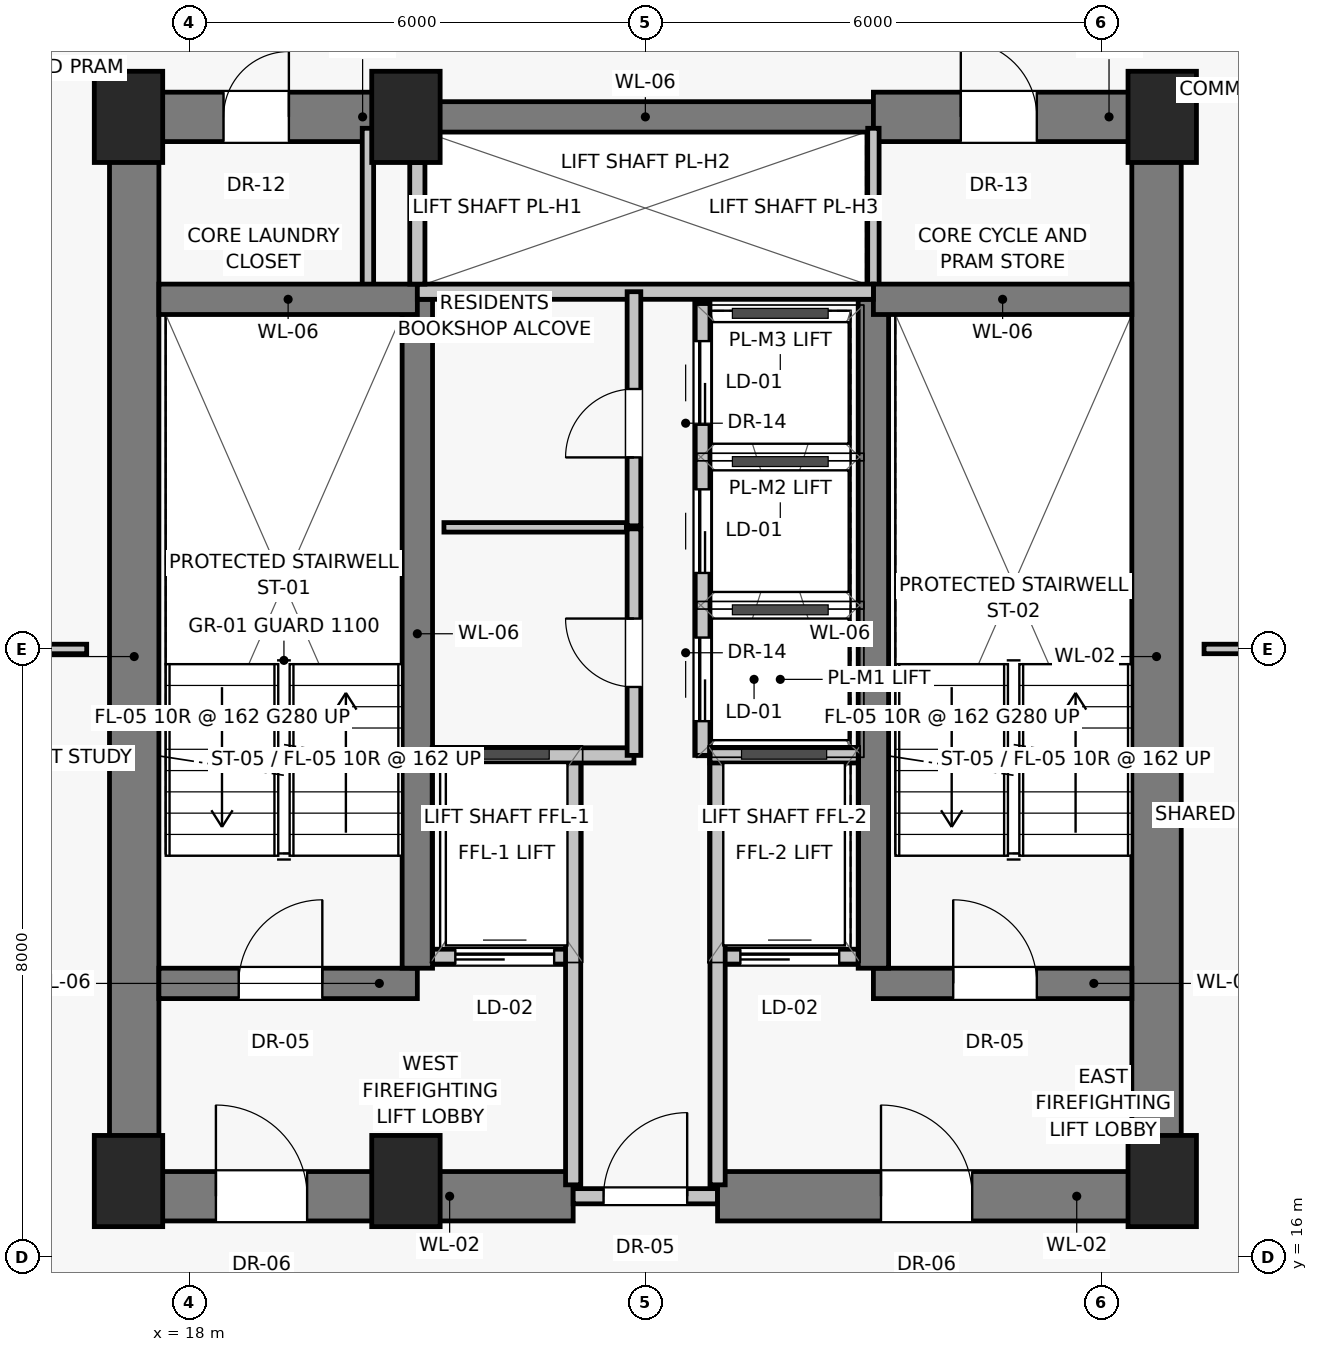
"""IFC4 building model, lengths in metres.
Left out: names, types, materials, properties, quantities, classifications, styles, units other than length and angle.
Written with IfcOpenShell. Run it as: python <this file> out.ifc"""

import sys

from ifc_helpers import new_model, si_unit, direction, frame, frame_2d, origin, origin_2d, place, context, subcontext, project, spatial, rectangle, extrude, source, transform, mapped, element, fill, save


model = new_model("IFC4")
c1 = context("Model", 3, precision=1e-05, world=origin(), true_north=direction((0.0, 1.0)))
c2 = subcontext(c1, "Body", "Model", "MODEL_VIEW")
j1 = project(units=[si_unit("LENGTHUNIT", "METRE"), si_unit("PLANEANGLEUNIT", "RADIAN")], contexts=[c1])
p1 = place(None, origin())
s1 = spatial("IfcSite", under=j1, at=p1, CompositionType="ELEMENT")
p2 = place(p1, origin())
s2 = spatial("IfcBuilding", under=s1, at=p2, CompositionType="ELEMENT")
p3 = place(p2, frame((0.0, 0.0, 105.7)))
s3 = spatial("IfcBuildingStorey", under=s2, at=p3, CompositionType="ELEMENT", Elevation=105.7)
for number, where, z_axis, x_axis in (
    (1, (17.2, 17.0, 0.0), (0.0, 0.0, 1.0), (1.0, 0.0, 0.0)),
    (2, (20.85, 17.0, 0.0), (0.0, 0.0, 1.0), (1.0, 0.0, 0.0)),
    (3, (30.8, 17.0, 0.0), (0.0, 0.0, 1.0), (1.0, 0.0, 0.0)),
    (4, (17.2, 31.0, 0.0), (0.0, 0.0, 1.0), (1.0, 0.0, 0.0)),
    (5, (20.85, 31.0, 0.0), (0.0, 0.0, 1.0), (1.0, 0.0, 0.0)),
    (6, (30.8, 31.0, 0.0), (0.0, 0.0, 1.0), (1.0, 0.0, 0.0)),
):
    element("IfcColumn", number, at=place(p3, frame(where, z_axis=z_axis, x_axis=x_axis)), inside=s3, PredefinedType="PILASTER", context=c2, shape_type="SweptSolid", body=[
        extrude(rectangle(XDim=0.9, YDim=1.2, at=origin_2d()), origin(), (0.0, 0.0, 1.0), 3.25),
    ])
for number, where, z_axis, x_axis in (
    (7, (17.275, 16.8, 0.0), (0.0, 0.0, 1.0), (0.0, 1.0, 0.0)),
    (8, (30.725, 16.8, 0.0), (0.0, 0.0, 1.0), (0.0, 1.0, 0.0)),
):
    element("IfcWall", number, at=place(p3, frame(where, z_axis=z_axis, x_axis=x_axis)), inside=s3, PredefinedType="SHEAR", context=c2, shape_type="SweptSolid", body=[
        extrude(rectangle(XDim=14.2, YDim=0.65, at=frame_2d((7.1, 0.0))), origin(), (0.0, 0.0, 1.0), 2.97),
    ])
p4 = place(p3, frame((17.2, 16.8, 0.0), z_axis=(0.0, 0.0, 1.0), x_axis=(1.0, 0.0, 0.0)))
e9 = element("IfcWall", 9, at=p4, inside=s3, PredefinedType="SHEAR", context=c2, shape_type="SweptSolid", body=[
    extrude(rectangle(XDim=5.85, YDim=0.65, at=frame_2d((2.925, 0.0))), origin(), (0.0, 0.0, 1.0), 2.97),
])
p5 = place(p4, frame((1.15, 0.0, 0.0)))
e10 = element("IfcOpeningElement", 10, at=p5, cuts=e9, PredefinedType="OPENING", context=c2, shape_type="SweptSolid", body=[
    extrude(rectangle(XDim=1.2, YDim=2.03, at=frame_2d((0.6, 1.015))), frame((0.0, 0.335, 0.0), z_axis=(0.0, -1.0, 0.0), x_axis=(1.0, 0.0, 0.0)), (0.0, 0.0, 1.0), 0.67),
])
p6 = place(p3, frame((23.05, 16.8, 0.0), z_axis=(0.0, 0.0, 1.0), x_axis=(1.0, 0.0, 0.0)))
e11 = element("IfcWall", 11, at=p6, inside=s3, PredefinedType="SOLIDWALL", context=c2, shape_type="SweptSolid", body=[
    extrude(rectangle(XDim=1.9, YDim=0.2, at=frame_2d((0.95, 0.0))), origin(), (0.0, 0.0, 1.0), 2.12),
])
p7 = place(p6, frame((0.4, 0.0, 0.0)))
e12 = element("IfcOpeningElement", 12, at=p7, cuts=e11, PredefinedType="OPENING", context=c2, shape_type="SweptSolid", body=[
    extrude(rectangle(XDim=1.1, YDim=2.03, at=frame_2d((0.55, 1.015))), frame((0.0, 0.11, 0.0), z_axis=(0.0, -1.0, 0.0), x_axis=(1.0, 0.0, 0.0)), (0.0, 0.0, 1.0), 0.22),
])
p8 = place(p3, frame((24.95, 16.8, 0.0), z_axis=(0.0, 0.0, 1.0), x_axis=(1.0, 0.0, 0.0)))
e13 = element("IfcWall", 13, at=p8, inside=s3, PredefinedType="SHEAR", context=c2, shape_type="SweptSolid", body=[
    extrude(rectangle(XDim=5.85, YDim=0.65, at=frame_2d((2.925, 0.0))), origin(), (0.0, 0.0, 1.0), 2.97),
])
p9 = place(p8, frame((2.15, 0.0, 0.0)))
e14 = element("IfcOpeningElement", 14, at=p9, cuts=e13, PredefinedType="OPENING", context=c2, shape_type="SweptSolid", body=[
    extrude(rectangle(XDim=1.2, YDim=2.03, at=frame_2d((0.6, 1.015))), frame((0.0, 0.335, 0.0), z_axis=(0.0, -1.0, 0.0), x_axis=(1.0, 0.0, 0.0)), (0.0, 0.0, 1.0), 0.67),
])
p10 = place(p3, frame((17.2, 31.0, 0.0), z_axis=(0.0, 0.0, 1.0), x_axis=(1.0, 0.0, 0.0)))
e15 = element("IfcWall", 15, at=p10, inside=s3, PredefinedType="SHEAR", context=c2, shape_type="SweptSolid", body=[
    extrude(rectangle(XDim=3.8, YDim=0.65, at=frame_2d((1.9, 0.0))), origin(), (0.0, 0.0, 1.0), 2.97),
])
p11 = place(p10, frame((1.25, 0.0, 0.0)))
e16 = element("IfcOpeningElement", 16, at=p11, cuts=e15, PredefinedType="OPENING", context=c2, shape_type="SweptSolid", body=[
    extrude(rectangle(XDim=0.86, YDim=2.01, at=frame_2d((0.43, 1.005))), frame((0.0, 0.335, 0.0), z_axis=(0.0, -1.0, 0.0), x_axis=(1.0, 0.0, 0.0)), (0.0, 0.0, 1.0), 0.67),
])
p12 = place(p3, frame((21.0, 31.0, 0.0), z_axis=(0.0, 0.0, 1.0), x_axis=(1.0, 0.0, 0.0)))
e17 = element("IfcWall", 17, at=p12, inside=s3, PredefinedType="SHEAR", context=c2, shape_type="SweptSolid", body=[
    extrude(rectangle(XDim=6.0, YDim=0.4, at=frame_2d((3.0, 0.0))), origin(), (0.0, 0.0, 1.0), 2.97),
])
p13 = place(p3, frame((27.0, 31.0, 0.0), z_axis=(0.0, 0.0, 1.0), x_axis=(1.0, 0.0, 0.0)))
e18 = element("IfcWall", 18, at=p13, inside=s3, PredefinedType="SHEAR", context=c2, shape_type="SweptSolid", body=[
    extrude(rectangle(XDim=3.8, YDim=0.65, at=frame_2d((1.9, 0.0))), origin(), (0.0, 0.0, 1.0), 2.97),
])
p14 = place(p13, frame((1.15, 0.0, 0.0)))
e19 = element("IfcOpeningElement", 19, at=p14, cuts=e18, PredefinedType="OPENING", context=c2, shape_type="SweptSolid", body=[
    extrude(rectangle(XDim=1.0, YDim=2.01, at=frame_2d((0.5, 1.005))), frame((0.0, 0.335, 0.0), z_axis=(0.0, -1.0, 0.0), x_axis=(1.0, 0.0, 0.0)), (0.0, 0.0, 1.0), 0.67),
])
for number, where, z_axis, x_axis in (
    (20, (20.35, 28.65, 0.0), (0.0, 0.0, 1.0), (0.0, 1.0, 0.0)),
    (21, (27.0, 28.65, 0.0), (0.0, 0.0, 1.0), (0.0, 1.0, 0.0)),
):
    element("IfcWall", number, at=place(p3, frame(where, z_axis=z_axis, x_axis=x_axis)), inside=s3, PredefinedType="PARTITIONING", context=c2, shape_type="SweptSolid", body=[
        extrude(rectangle(XDim=2.2, YDim=0.15, at=frame_2d((1.1, 0.0))), origin(), (0.0, 0.0, 1.0), 2.97),
    ])
p15 = place(p3, frame((17.6, 19.6, 0.0), z_axis=(0.0, 0.0, 1.0), x_axis=(1.0, 0.0, 0.0)))
e22 = element("IfcWall", 22, at=p15, inside=s3, PredefinedType="SHEAR", context=c2, shape_type="SweptSolid", body=[
    extrude(rectangle(XDim=3.4, YDim=0.4, at=frame_2d((1.7, 0.0))), origin(), (0.0, 0.0, 1.0), 2.97),
])
p16 = place(p15, frame((1.05, 0.0, 0.0)))
e23 = element("IfcOpeningElement", 23, at=p16, cuts=e22, PredefinedType="OPENING", context=c2, shape_type="SweptSolid", body=[
    extrude(rectangle(XDim=1.1, YDim=2.03, at=frame_2d((0.55, 1.015))), frame((0.0, 0.21, 0.0), z_axis=(0.0, -1.0, 0.0), x_axis=(1.0, 0.0, 0.0)), (0.0, 0.0, 1.0), 0.42),
])
p17 = place(p3, frame((21.2, 19.95, 0.0), z_axis=(0.0, 0.0, 1.0), x_axis=(1.0, 0.0, 0.0)))
e24 = element("IfcWall", 24, at=p17, inside=s3, PredefinedType="SOLIDWALL", context=c2, shape_type="SweptSolid", body=[
    extrude(rectangle(XDim=1.85, YDim=0.2, at=frame_2d((0.925, 0.0))), origin(), (0.0, 0.0, 1.0), 2.97),
])
p18 = place(p17, frame((0.3, 0.0, 0.0)))
e25 = element("IfcOpeningElement", 25, at=p18, cuts=e24, PredefinedType="OPENING", context=c2, shape_type="SweptSolid", body=[
    extrude(rectangle(XDim=1.3, YDim=2.25, at=frame_2d((0.65, 1.125))), frame((0.0, 0.11, 0.0), z_axis=(0.0, -1.0, 0.0), x_axis=(1.0, 0.0, 0.0)), (0.0, 0.0, 1.0), 0.22),
])
p19 = place(p3, frame((24.95, 19.95, 0.0), z_axis=(0.0, 0.0, 1.0), x_axis=(1.0, 0.0, 0.0)))
e26 = element("IfcWall", 26, at=p19, inside=s3, PredefinedType="SOLIDWALL", context=c2, shape_type="SweptSolid", body=[
    extrude(rectangle(XDim=1.85, YDim=0.2, at=frame_2d((0.925, 0.0))), origin(), (0.0, 0.0, 1.0), 2.97),
])
p20 = place(p19, frame((0.3, 0.0, 0.0)))
e27 = element("IfcOpeningElement", 27, at=p20, cuts=e26, PredefinedType="OPENING", context=c2, shape_type="SweptSolid", body=[
    extrude(rectangle(XDim=1.3, YDim=2.25, at=frame_2d((0.65, 1.125))), frame((0.0, 0.11, 0.0), z_axis=(0.0, -1.0, 0.0), x_axis=(1.0, 0.0, 0.0)), (0.0, 0.0, 1.0), 0.22),
])
p21 = place(p3, frame((27.0, 19.6, 0.0), z_axis=(0.0, 0.0, 1.0), x_axis=(1.0, 0.0, 0.0)))
e28 = element("IfcWall", 28, at=p21, inside=s3, PredefinedType="SHEAR", context=c2, shape_type="SweptSolid", body=[
    extrude(rectangle(XDim=3.4, YDim=0.4, at=frame_2d((1.7, 0.0))), origin(), (0.0, 0.0, 1.0), 2.97),
])
p22 = place(p21, frame((1.05, 0.0, 0.0)))
e29 = element("IfcOpeningElement", 29, at=p22, cuts=e28, PredefinedType="OPENING", context=c2, shape_type="SweptSolid", body=[
    extrude(rectangle(XDim=1.1, YDim=2.03, at=frame_2d((0.55, 1.015))), frame((0.0, 0.21, 0.0), z_axis=(0.0, -1.0, 0.0), x_axis=(1.0, 0.0, 0.0)), (0.0, 0.0, 1.0), 0.42),
])
for number, where, z_axis, x_axis in (
    (30, (21.0, 19.8, 0.0), (0.0, 0.0, 1.0), (0.0, 1.0, 0.0)),
    (31, (27.0, 19.8, 0.0), (0.0, 0.0, 1.0), (0.0, 1.0, 0.0)),
):
    element("IfcWall", number, at=place(p3, frame(where, z_axis=z_axis, x_axis=x_axis)), inside=s3, PredefinedType="SHEAR", context=c2, shape_type="SweptSolid", body=[
        extrude(rectangle(XDim=8.8, YDim=0.4, at=frame_2d((4.4, 0.0))), origin(), (0.0, 0.0, 1.0), 2.97),
    ])
for number, where, z_axis, x_axis in (
    (32, (17.6, 28.6, 0.0), (0.0, 0.0, 1.0), (1.0, 0.0, 0.0)),
    (33, (27.0, 28.6, 0.0), (0.0, 0.0, 1.0), (1.0, 0.0, 0.0)),
):
    element("IfcWall", number, at=place(p3, frame(where, z_axis=z_axis, x_axis=x_axis)), inside=s3, PredefinedType="SHEAR", context=c2, shape_type="SweptSolid", body=[
        extrude(rectangle(XDim=3.4, YDim=0.4, at=frame_2d((1.7, 0.0))), origin(), (0.0, 0.0, 1.0), 2.97),
    ])
for number, where, z_axis, x_axis in (
    (34, (23.05, 16.95, 0.0), (0.0, 0.0, 1.0), (0.0, 1.0, 0.0)),
    (35, (24.95, 16.95, 0.0), (0.0, 0.0, 1.0), (0.0, 1.0, 0.0)),
):
    element("IfcWall", number, at=place(p3, frame(where, z_axis=z_axis, x_axis=x_axis)), inside=s3, PredefinedType="SOLIDWALL", context=c2, shape_type="SweptSolid", body=[
        extrude(rectangle(XDim=5.6, YDim=0.2, at=frame_2d((2.8, 0.0))), origin(), (0.0, 0.0, 1.0), 2.97),
    ])
p23 = place(p3, frame((21.2, 22.6, 0.0), z_axis=(0.0, 0.0, 1.0), x_axis=(1.0, 0.0, 0.0)))
e36 = element("IfcWall", 36, at=p23, inside=s3, PredefinedType="SOLIDWALL", context=c2, shape_type="SweptSolid", body=[
    extrude(rectangle(XDim=2.65, YDim=0.2, at=frame_2d((1.325, 0.0))), origin(), (0.0, 0.0, 1.0), 2.97),
])
p24 = place(p3, frame((24.85, 22.6, 0.0), z_axis=(0.0, 0.0, 1.0), x_axis=(1.0, 0.0, 0.0)))
e37 = element("IfcWall", 37, at=p24, inside=s3, PredefinedType="SOLIDWALL", context=c2, shape_type="SweptSolid", body=[
    extrude(rectangle(XDim=1.95, YDim=0.2, at=frame_2d((0.975, 0.0))), origin(), (0.0, 0.0, 1.0), 2.97),
])
p25 = place(p3, frame((21.0, 28.7, 0.0), z_axis=(0.0, 0.0, 1.0), x_axis=(1.0, 0.0, 0.0)))
e38 = element("IfcWall", 38, at=p25, inside=s3, PredefinedType="SOLIDWALL", context=c2, shape_type="SweptSolid", body=[
    extrude(rectangle(XDim=6.0, YDim=0.2, at=frame_2d((3.0, 0.0))), origin(), (0.0, 0.0, 1.0), 2.97),
])
p26 = place(p3, frame((21.0, 28.8, 0.0), z_axis=(0.0, 0.0, 1.0), x_axis=(0.0, 1.0, 0.0)))
e39 = element("IfcWall", 39, at=p26, inside=s3, PredefinedType="SOLIDWALL", context=c2, shape_type="SweptSolid", body=[
    extrude(rectangle(XDim=1.6, YDim=0.2, at=frame_2d((0.8, 0.0))), origin(), (0.0, 0.0, 1.0), 2.97),
])
p27 = place(p3, frame((23.85, 22.6, 0.0), z_axis=(0.0, 0.0, 1.0), x_axis=(0.0, 1.0, 0.0)))
e40 = element("IfcWall", 40, at=p27, inside=s3, PredefinedType="PARTITIONING", context=c2, shape_type="SweptSolid", body=[
    extrude(rectangle(XDim=2.98, YDim=0.18, at=frame_2d((1.49, 0.0))), origin(), (0.0, 0.0, 1.0), 2.97),
])
p28 = place(p27, frame((0.9, 0.0, 0.0)))
e41 = element("IfcOpeningElement", 41, at=p28, cuts=e40, PredefinedType="OPENING", context=c2, shape_type="SweptSolid", body=[
    extrude(rectangle(XDim=0.9, YDim=2.01, at=frame_2d((0.45, 1.005))), frame((0.0, 0.1, 0.0), z_axis=(0.0, -1.0, 0.0), x_axis=(1.0, 0.0, 0.0)), (0.0, 0.0, 1.0), 0.2),
])
p29 = place(p3, frame((23.85, 25.62, 0.0), z_axis=(0.0, 0.0, 1.0), x_axis=(0.0, 1.0, 0.0)))
e42 = element("IfcWall", 42, at=p29, inside=s3, PredefinedType="PARTITIONING", context=c2, shape_type="SweptSolid", body=[
    extrude(rectangle(XDim=3.08, YDim=0.18, at=frame_2d((1.54, 0.0))), origin(), (0.0, 0.0, 1.0), 2.97),
])
p30 = place(p29, frame((0.9, 0.0, 0.0)))
e43 = element("IfcOpeningElement", 43, at=p30, cuts=e42, PredefinedType="OPENING", context=c2, shape_type="SweptSolid", body=[
    extrude(rectangle(XDim=0.9, YDim=2.01, at=frame_2d((0.45, 1.005))), frame((0.0, 0.1, 0.0), z_axis=(0.0, -1.0, 0.0), x_axis=(1.0, 0.0, 0.0)), (0.0, 0.0, 1.0), 0.2),
])
p31 = place(p3, frame((24.75, 22.6, 0.0), z_axis=(0.0, 0.0, 1.0), x_axis=(0.0, 1.0, 0.0)))
e44 = element("IfcWall", 44, at=p31, inside=s3, PredefinedType="SOLIDWALL", context=c2, shape_type="SweptSolid", body=[
    extrude(rectangle(XDim=5.95, YDim=0.2, at=frame_2d((2.975, 0.0))), origin(), (0.0, 0.0, 1.0), 2.97),
])
p32 = place(p31, frame((0.45, 0.0, 0.0)))
e45 = element("IfcOpeningElement", 45, at=p32, cuts=e44, PredefinedType="OPENING", context=c2, shape_type="SweptSolid", body=[
    extrude(rectangle(XDim=1.1, YDim=2.08, at=frame_2d((0.55, 1.04))), frame((0.0, 0.11, 0.0), z_axis=(0.0, -1.0, 0.0), x_axis=(1.0, 0.0, 0.0)), (0.0, 0.0, 1.0), 0.22),
])
p33 = place(p31, frame((2.4, 0.0, 0.0)))
e46 = element("IfcOpeningElement", 46, at=p33, cuts=e44, PredefinedType="OPENING", context=c2, shape_type="SweptSolid", body=[
    extrude(rectangle(XDim=1.1, YDim=2.08, at=frame_2d((0.55, 1.04))), frame((0.0, 0.11, 0.0), z_axis=(0.0, -1.0, 0.0), x_axis=(1.0, 0.0, 0.0)), (0.0, 0.0, 1.0), 0.22),
])
p34 = place(p31, frame((4.35, 0.0, 0.0)))
e47 = element("IfcOpeningElement", 47, at=p34, cuts=e44, PredefinedType="OPENING", context=c2, shape_type="SweptSolid", body=[
    extrude(rectangle(XDim=1.1, YDim=2.08, at=frame_2d((0.55, 1.04))), frame((0.0, 0.11, 0.0), z_axis=(0.0, -1.0, 0.0), x_axis=(1.0, 0.0, 0.0)), (0.0, 0.0, 1.0), 0.22),
])
p35 = place(p3, frame((21.35, 25.6, 0.0), z_axis=(0.0, 0.0, 1.0), x_axis=(1.0, 0.0, 0.0)))
e48 = element("IfcWall", 48, at=p35, inside=s3, PredefinedType="PARTITIONING", context=c2, shape_type="SweptSolid", body=[
    extrude(rectangle(XDim=2.4, YDim=0.125, at=frame_2d((1.2, 0.0))), origin(), (0.0, 0.0, 1.0), 2.97),
])
for number, where, z_axis, x_axis in (
    (49, (14.55, 24.0, 0.0), (0.0, 0.0, 1.0), (1.0, 0.0, 0.0)),
    (50, (31.35, 24.0, 0.0), (0.0, 0.0, 1.0), (1.0, 0.0, 0.0)),
):
    element("IfcWall", number, at=place(p3, frame(where, z_axis=z_axis, x_axis=x_axis)), inside=s3, PredefinedType="PARTITIONING", context=c2, shape_type="SweptSolid", body=[
        extrude(rectangle(XDim=2.1, YDim=0.125, at=frame_2d((1.05, 0.0))), origin(), (0.0, 0.0, 1.0), 2.97),
    ])
m1 = source(origin(), c2, "Body", "SweptSolid", [
    extrude(rectangle(XDim=1.2, YDim=2.03, at=frame_2d((0.6, 1.015))), frame((0.0, 0.025, 0.0), z_axis=(0.0, -1.0, 0.0), x_axis=(1.0, 0.0, 0.0)), (0.0, 0.0, 1.0), 0.05),
])
p36 = place(p5, origin())
e51 = element("IfcDoor", 51, at=p36, inside=s3, OperationType="SINGLE_SWING_LEFT", PredefinedType="DOOR", context=c2, shape_type="MappedRepresentation", body=[
    mapped(m1, transform((0.0, 0.0, 0.0), scale=1.0)),
])
fill(e10, e51)
m2 = source(origin(), c2, "Body", "SweptSolid", [
    extrude(rectangle(XDim=1.1, YDim=2.03, at=frame_2d((0.55, 1.015))), frame((0.0, 0.025, 0.0), z_axis=(0.0, -1.0, 0.0), x_axis=(1.0, 0.0, 0.0)), (0.0, 0.0, 1.0), 0.05),
])
p37 = place(p7, origin())
e52 = element("IfcDoor", 52, at=p37, inside=s3, OperationType="SINGLE_SWING_RIGHT", PredefinedType="DOOR", context=c2, shape_type="MappedRepresentation", body=[
    mapped(m2, transform((0.0, 0.0, 0.0), scale=1.0)),
])
fill(e12, e52)
p38 = place(p9, origin())
e53 = element("IfcDoor", 53, at=p38, inside=s3, OperationType="SINGLE_SWING_LEFT", PredefinedType="DOOR", context=c2, shape_type="MappedRepresentation", body=[
    mapped(m1, transform((0.0, 0.0, 0.0), scale=1.0)),
])
fill(e14, e53)
m3 = source(origin(), c2, "Body", "SweptSolid", [
    extrude(rectangle(XDim=0.86, YDim=2.01, at=frame_2d((0.43, 1.005))), frame((0.0, 0.025, 0.0), z_axis=(0.0, -1.0, 0.0), x_axis=(1.0, 0.0, 0.0)), (0.0, 0.0, 1.0), 0.05),
])
p39 = place(p11, origin())
e54 = element("IfcDoor", 54, at=p39, inside=s3, OperationType="SINGLE_SWING_RIGHT", PredefinedType="DOOR", context=c2, shape_type="MappedRepresentation", body=[
    mapped(m3, transform((0.0, 0.0, 0.0), scale=1.0)),
])
fill(e16, e54)
m4 = source(origin(), c2, "Body", "SweptSolid", [
    extrude(rectangle(XDim=1.0, YDim=2.01, at=frame_2d((0.5, 1.005))), frame((0.0, 0.025, 0.0), z_axis=(0.0, -1.0, 0.0), x_axis=(1.0, 0.0, 0.0)), (0.0, 0.0, 1.0), 0.05),
])
p40 = place(p14, origin())
e55 = element("IfcDoor", 55, at=p40, inside=s3, OperationType="SINGLE_SWING_LEFT", PredefinedType="DOOR", context=c2, shape_type="MappedRepresentation", body=[
    mapped(m4, transform((0.0, 0.0, 0.0), scale=1.0)),
])
fill(e19, e55)
p41 = place(p16, origin())
e56 = element("IfcDoor", 56, at=p41, inside=s3, OperationType="SINGLE_SWING_RIGHT", PredefinedType="DOOR", context=c2, shape_type="MappedRepresentation", body=[
    mapped(m2, transform((0.0, 0.0, 0.0), scale=1.0)),
])
fill(e23, e56)
m5 = source(origin(), c2, "Body", "SweptSolid", [
    extrude(rectangle(XDim=1.3, YDim=2.25, at=frame_2d((0.65, 1.125))), frame((0.0, 0.025, 0.0), z_axis=(0.0, -1.0, 0.0), x_axis=(1.0, 0.0, 0.0)), (0.0, 0.0, 1.0), 0.05),
])
p42 = place(p18, origin())
e57 = element("IfcDoor", 57, at=p42, inside=s3, OperationType="SLIDING_TO_LEFT", PredefinedType="DOOR", context=c2, shape_type="MappedRepresentation", body=[
    mapped(m5, transform((0.0, 0.0, 0.0), scale=1.0)),
])
fill(e25, e57)
p43 = place(p20, origin())
e58 = element("IfcDoor", 58, at=p43, inside=s3, OperationType="SLIDING_TO_LEFT", PredefinedType="DOOR", context=c2, shape_type="MappedRepresentation", body=[
    mapped(m5, transform((0.0, 0.0, 0.0), scale=1.0)),
])
fill(e27, e58)
p44 = place(p22, origin())
e59 = element("IfcDoor", 59, at=p44, inside=s3, OperationType="SINGLE_SWING_LEFT", PredefinedType="DOOR", context=c2, shape_type="MappedRepresentation", body=[
    mapped(m2, transform((0.0, 0.0, 0.0), scale=1.0)),
])
fill(e29, e59)
m6 = source(origin(), c2, "Body", "SweptSolid", [
    extrude(rectangle(XDim=0.9, YDim=2.01, at=frame_2d((0.45, 1.005))), frame((0.0, 0.025, 0.0), z_axis=(0.0, -1.0, 0.0), x_axis=(1.0, 0.0, 0.0)), (0.0, 0.0, 1.0), 0.05),
])
p45 = place(p28, origin())
e60 = element("IfcDoor", 60, at=p45, inside=s3, OperationType="SINGLE_SWING_RIGHT", PredefinedType="DOOR", context=c2, shape_type="MappedRepresentation", body=[
    mapped(m6, transform((0.0, 0.0, 0.0), scale=1.0)),
])
fill(e41, e60)
p46 = place(p30, origin())
e61 = element("IfcDoor", 61, at=p46, inside=s3, OperationType="SINGLE_SWING_LEFT", PredefinedType="DOOR", context=c2, shape_type="MappedRepresentation", body=[
    mapped(m6, transform((0.0, 0.0, 0.0), scale=1.0)),
])
fill(e43, e61)
m7 = source(origin(), c2, "Body", "SweptSolid", [
    extrude(rectangle(XDim=1.1, YDim=2.08, at=frame_2d((0.55, 1.04))), frame((0.0, 0.025, 0.0), z_axis=(0.0, -1.0, 0.0), x_axis=(1.0, 0.0, 0.0)), (0.0, 0.0, 1.0), 0.05),
])
p47 = place(p32, origin())
e62 = element("IfcDoor", 62, at=p47, inside=s3, OperationType="SLIDING_TO_LEFT", PredefinedType="DOOR", context=c2, shape_type="MappedRepresentation", body=[
    mapped(m7, transform((0.0, 0.0, 0.0), scale=1.0)),
])
fill(e45, e62)
p48 = place(p33, origin())
e63 = element("IfcDoor", 63, at=p48, inside=s3, OperationType="SLIDING_TO_LEFT", PredefinedType="DOOR", context=c2, shape_type="MappedRepresentation", body=[
    mapped(m7, transform((0.0, 0.0, 0.0), scale=1.0)),
])
fill(e46, e63)
p49 = place(p34, origin())
e64 = element("IfcDoor", 64, at=p49, inside=s3, OperationType="SLIDING_TO_LEFT", PredefinedType="DOOR", context=c2, shape_type="MappedRepresentation", body=[
    mapped(m7, transform((0.0, 0.0, 0.0), scale=1.0)),
])
fill(e47, e64)
save(model, sys.argv[1])
